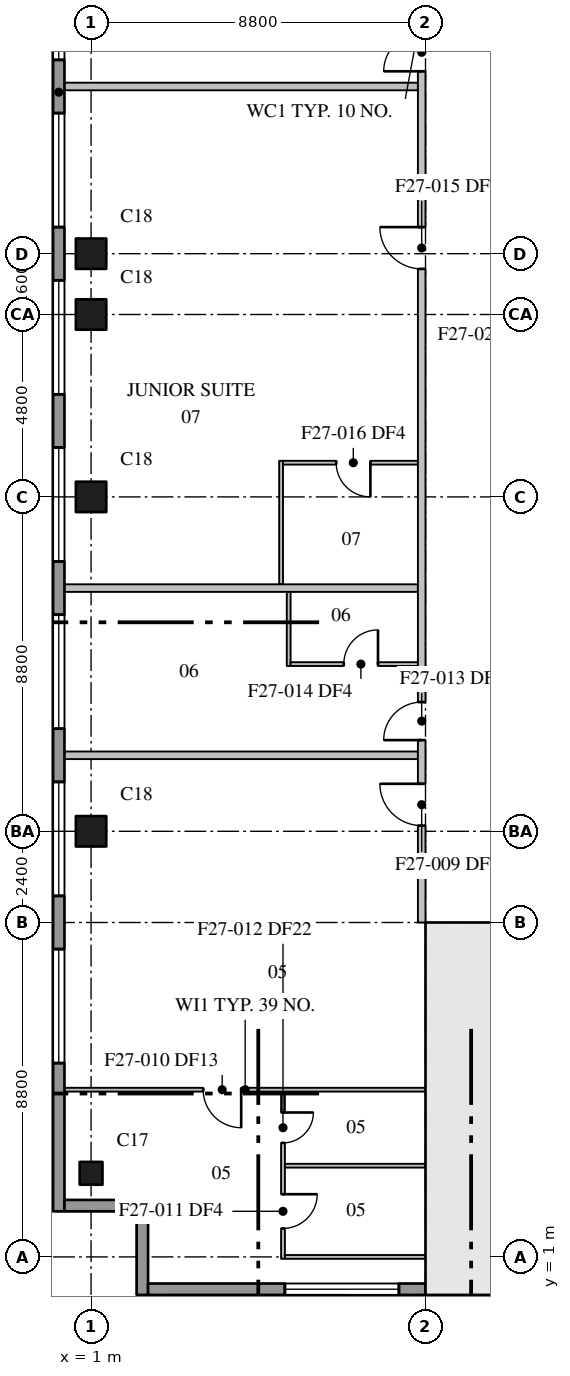
"""IFC4 building model, lengths in metres.
Left out: names, types, materials, properties, quantities, classifications, styles, units other than length and angle.
Written with IfcOpenShell. Run it as: python <this file> out.ifc"""

import sys

from ifc_helpers import new_model, si_unit, direction, frame, frame_2d, origin, origin_2d, place, context, subcontext, project, spatial, rectangle, extrude, element, fill, save


model = new_model("IFC4")
c1 = context("Model", 3, precision=1e-05, world=origin(), true_north=direction((0.0, 1.0)))
c2 = subcontext(c1, "Body", "Model", "MODEL_VIEW")
j1 = project(units=[si_unit("LENGTHUNIT", "METRE"), si_unit("PLANEANGLEUNIT", "RADIAN")], contexts=[c1])
p1 = place(None, origin())
s1 = spatial("IfcSite", under=j1, at=p1, CompositionType="ELEMENT")
p2 = place(p1, origin())
s2 = spatial("IfcBuilding", under=s1, at=p2, CompositionType="ELEMENT")
p3 = place(p2, frame((0.0, 0.0, 226.5)))
s3 = spatial("IfcBuildingStorey", under=s2, at=p3, CompositionType="ELEMENT", Elevation=226.5)
p4 = place(p3, frame((1.0, 3.2, 0.0), z_axis=(0.0, 0.0, 1.0), x_axis=(1.0, 0.0, 0.0)))
e1 = element("IfcColumn", 1, at=p4, inside=s3, PredefinedType="COLUMN", context=c2, shape_type="SweptSolid", body=[
    extrude(rectangle(XDim=0.6, YDim=0.6, at=origin_2d()), origin(), (0.0, 0.0, 1.0), 3.7),
])
for number, where, z_axis, x_axis in (
    (2, (1.0, 12.2, 0.0), (0.0, 0.0, 1.0), (1.0, 0.0, 0.0)),
    (3, (1.0, 21.0, 0.0), (0.0, 0.0, 1.0), (1.0, 0.0, 0.0)),
    (4, (1.0, 25.8, 0.0), (0.0, 0.0, 1.0), (1.0, 0.0, 0.0)),
    (5, (1.0, 27.4, 0.0), (0.0, 0.0, 1.0), (1.0, 0.0, 0.0)),
):
    element("IfcColumn", number, at=place(p3, frame(where, z_axis=z_axis, x_axis=x_axis)), inside=s3, PredefinedType="COLUMN", context=c2, shape_type="SweptSolid", body=[
        extrude(rectangle(XDim=0.8, YDim=0.8, at=origin_2d()), origin(), (0.0, 0.0, 1.0), 3.7),
    ])
p5 = place(p3, frame((9.8, 0.95, 0.0), z_axis=(0.0, 0.0, 1.0), x_axis=(1.0, 0.0, 0.0)))
e6 = element("IfcWall", 6, at=p5, inside=s3, PredefinedType="SHEAR", context=c2, shape_type="SweptSolid", body=[
    extrude(rectangle(XDim=35.2, YDim=0.5, at=frame_2d((17.6, 0.0))), origin(), (0.0, 0.0, 1.0), 3.7),
])
p6 = place(p3, frame((10.75, 1.2, 0.0), z_axis=(0.0, 0.0, 1.0), x_axis=(0.0, 1.0, 0.0)))
e7 = element("IfcWall", 7, at=p6, inside=s3, PredefinedType="SHEAR", context=c2, shape_type="SweptSolid", body=[
    extrude(rectangle(XDim=8.6, YDim=0.5, at=frame_2d((4.3, 0.0))), origin(), (0.0, 0.0, 1.0), 3.7),
])
p7 = place(p3, frame((9.8, 9.6, 0.0), z_axis=(0.0, 0.0, 1.0), x_axis=(1.0, 0.0, 0.0)))
e8 = element("IfcWall", 8, at=p7, inside=s3, PredefinedType="SHEAR", context=c2, shape_type="SweptSolid", body=[
    extrude(rectangle(XDim=4.3, YDim=0.4, at=frame_2d((2.15, 0.0))), origin(), (0.0, 0.0, 1.0), 3.7),
])
p8 = place(p7, frame((2.05, 0.0, 0.0)))
e9 = element("IfcOpeningElement", 9, at=p8, cuts=e8, PredefinedType="OPENING", context=c2, shape_type="SweptSolid", body=[
    extrude(rectangle(XDim=1.2, YDim=2.1, at=frame_2d((0.6, 1.05))), frame((0.0, 0.21, 0.0), z_axis=(0.0, -1.0, 0.0), x_axis=(1.0, 0.0, 0.0)), (0.0, 0.0, 1.0), 0.42),
])
p9 = place(p3, frame((0.15, 61.1, 0.0), z_axis=(0.0, 0.0, 1.0), x_axis=(0.0, -1.0, 0.0)))
e10 = element("IfcWall", 10, at=p9, inside=s3, PredefinedType="STANDARD", context=c2, shape_type="SweptSolid", body=[
    extrude(rectangle(XDim=58.9, YDim=0.3, at=frame_2d((29.45, 0.0))), origin(), (0.0, 0.0, 1.0), 3.4),
])
p10 = place(p9, frame((3.6, 0.0, 0.75)))
e11 = element("IfcOpeningElement", 11, at=p10, cuts=e10, PredefinedType="OPENING", context=c2, shape_type="SweptSolid", body=[
    extrude(rectangle(XDim=3.0, YDim=2.3, at=frame_2d((1.5, 1.15))), frame((0.0, 0.16, 0.0), z_axis=(0.0, -1.0, 0.0), x_axis=(1.0, 0.0, 0.0)), (0.0, 0.0, 1.0), 0.32),
])
p11 = place(p9, frame((8.0, 0.0, 0.75)))
e12 = element("IfcOpeningElement", 12, at=p11, cuts=e10, PredefinedType="OPENING", context=c2, shape_type="SweptSolid", body=[
    extrude(rectangle(XDim=3.0, YDim=2.3, at=frame_2d((1.5, 1.15))), frame((0.0, 0.16, 0.0), z_axis=(0.0, -1.0, 0.0), x_axis=(1.0, 0.0, 0.0)), (0.0, 0.0, 1.0), 0.32),
])
p12 = place(p9, frame((12.4, 0.0, 0.75)))
e13 = element("IfcOpeningElement", 13, at=p12, cuts=e10, PredefinedType="OPENING", context=c2, shape_type="SweptSolid", body=[
    extrude(rectangle(XDim=3.0, YDim=2.3, at=frame_2d((1.5, 1.15))), frame((0.0, 0.16, 0.0), z_axis=(0.0, -1.0, 0.0), x_axis=(1.0, 0.0, 0.0)), (0.0, 0.0, 1.0), 0.32),
])
p13 = place(p9, frame((16.8, 0.0, 0.75)))
e14 = element("IfcOpeningElement", 14, at=p13, cuts=e10, PredefinedType="OPENING", context=c2, shape_type="SweptSolid", body=[
    extrude(rectangle(XDim=3.0, YDim=2.3, at=frame_2d((1.5, 1.15))), frame((0.0, 0.16, 0.0), z_axis=(0.0, -1.0, 0.0), x_axis=(1.0, 0.0, 0.0)), (0.0, 0.0, 1.0), 0.32),
])
p14 = place(p9, frame((21.2, 0.0, 0.75)))
e15 = element("IfcOpeningElement", 15, at=p14, cuts=e10, PredefinedType="OPENING", context=c2, shape_type="SweptSolid", body=[
    extrude(rectangle(XDim=3.0, YDim=2.3, at=frame_2d((1.5, 1.15))), frame((0.0, 0.16, 0.0), z_axis=(0.0, -1.0, 0.0), x_axis=(1.0, 0.0, 0.0)), (0.0, 0.0, 1.0), 0.32),
])
p15 = place(p9, frame((25.6, 0.0, 0.75)))
e16 = element("IfcOpeningElement", 16, at=p15, cuts=e10, PredefinedType="OPENING", context=c2, shape_type="SweptSolid", body=[
    extrude(rectangle(XDim=3.0, YDim=2.3, at=frame_2d((1.5, 1.15))), frame((0.0, 0.16, 0.0), z_axis=(0.0, -1.0, 0.0), x_axis=(1.0, 0.0, 0.0)), (0.0, 0.0, 1.0), 0.32),
])
p16 = place(p9, frame((30.0, 0.0, 0.75)))
e17 = element("IfcOpeningElement", 17, at=p16, cuts=e10, PredefinedType="OPENING", context=c2, shape_type="SweptSolid", body=[
    extrude(rectangle(XDim=3.0, YDim=2.3, at=frame_2d((1.5, 1.15))), frame((0.0, 0.16, 0.0), z_axis=(0.0, -1.0, 0.0), x_axis=(1.0, 0.0, 0.0)), (0.0, 0.0, 1.0), 0.32),
])
p17 = place(p9, frame((34.4, 0.0, 0.75)))
e18 = element("IfcOpeningElement", 18, at=p17, cuts=e10, PredefinedType="OPENING", context=c2, shape_type="SweptSolid", body=[
    extrude(rectangle(XDim=3.0, YDim=2.3, at=frame_2d((1.5, 1.15))), frame((0.0, 0.16, 0.0), z_axis=(0.0, -1.0, 0.0), x_axis=(1.0, 0.0, 0.0)), (0.0, 0.0, 1.0), 0.32),
])
p18 = place(p9, frame((38.8, 0.0, 0.75)))
e19 = element("IfcOpeningElement", 19, at=p18, cuts=e10, PredefinedType="OPENING", context=c2, shape_type="SweptSolid", body=[
    extrude(rectangle(XDim=3.0, YDim=2.3, at=frame_2d((1.5, 1.15))), frame((0.0, 0.16, 0.0), z_axis=(0.0, -1.0, 0.0), x_axis=(1.0, 0.0, 0.0)), (0.0, 0.0, 1.0), 0.32),
])
p19 = place(p9, frame((43.2, 0.0, 0.75)))
e20 = element("IfcOpeningElement", 20, at=p19, cuts=e10, PredefinedType="OPENING", context=c2, shape_type="SweptSolid", body=[
    extrude(rectangle(XDim=3.0, YDim=2.3, at=frame_2d((1.5, 1.15))), frame((0.0, 0.16, 0.0), z_axis=(0.0, -1.0, 0.0), x_axis=(1.0, 0.0, 0.0)), (0.0, 0.0, 1.0), 0.32),
])
p20 = place(p9, frame((47.6, 0.0, 0.75)))
e21 = element("IfcOpeningElement", 21, at=p20, cuts=e10, PredefinedType="OPENING", context=c2, shape_type="SweptSolid", body=[
    extrude(rectangle(XDim=3.0, YDim=2.3, at=frame_2d((1.5, 1.15))), frame((0.0, 0.16, 0.0), z_axis=(0.0, -1.0, 0.0), x_axis=(1.0, 0.0, 0.0)), (0.0, 0.0, 1.0), 0.32),
])
p21 = place(p9, frame((52.0, 0.0, 0.75)))
e22 = element("IfcOpeningElement", 22, at=p21, cuts=e10, PredefinedType="OPENING", context=c2, shape_type="SweptSolid", body=[
    extrude(rectangle(XDim=3.0, YDim=2.3, at=frame_2d((1.5, 1.15))), frame((0.0, 0.16, 0.0), z_axis=(0.0, -1.0, 0.0), x_axis=(1.0, 0.0, 0.0)), (0.0, 0.0, 1.0), 0.32),
])
for number, where, z_axis, x_axis in (
    (23, (0.3, 2.35, 0.0), (0.0, 0.0, 1.0), (1.0, 0.0, 0.0)),
    (24, (2.35, 2.2, 0.0), (0.0, 0.0, 1.0), (0.0, -1.0, 0.0)),
):
    element("IfcWall", number, at=place(p3, frame(where, z_axis=z_axis, x_axis=x_axis)), inside=s3, PredefinedType="STANDARD", context=c2, shape_type="SweptSolid", body=[
        extrude(rectangle(XDim=2.2, YDim=0.3, at=frame_2d((1.1, 0.0))), origin(), (0.0, 0.0, 1.0), 3.4),
    ])
p22 = place(p3, frame((2.5, 0.15, 0.0), z_axis=(0.0, 0.0, 1.0), x_axis=(1.0, 0.0, 0.0)))
e25 = element("IfcWall", 25, at=p22, inside=s3, PredefinedType="STANDARD", context=c2, shape_type="SweptSolid", body=[
    extrude(rectangle(XDim=7.3, YDim=0.3, at=frame_2d((3.65, 0.0))), origin(), (0.0, 0.0, 1.0), 3.4),
])
p23 = place(p22, frame((3.6, 0.0, 0.75)))
e26 = element("IfcOpeningElement", 26, at=p23, cuts=e25, PredefinedType="OPENING", context=c2, shape_type="SweptSolid", body=[
    extrude(rectangle(XDim=3.0, YDim=2.3, at=frame_2d((1.5, 1.15))), frame((0.0, 0.16, 0.0), z_axis=(0.0, -1.0, 0.0), x_axis=(1.0, 0.0, 0.0)), (0.0, 0.0, 1.0), 0.32),
])
p24 = place(p3, frame((9.7, 9.8, 0.0), z_axis=(0.0, 0.0, 1.0), x_axis=(0.0, 1.0, 0.0)))
e27 = element("IfcWall", 27, at=p24, inside=s3, PredefinedType="PARTITIONING", context=c2, shape_type="SweptSolid", body=[
    extrude(rectangle(XDim=48.0, YDim=0.2, at=frame_2d((24.0, 0.0))), origin(), (0.0, 0.0, 1.0), 3.4),
])
p25 = place(p24, frame((2.55, 0.0, 0.0)))
e28 = element("IfcOpeningElement", 28, at=p25, cuts=e27, PredefinedType="OPENING", context=c2, shape_type="SweptSolid", body=[
    extrude(rectangle(XDim=1.1, YDim=2.1, at=frame_2d((0.55, 1.05))), frame((0.0, 0.11, 0.0), z_axis=(0.0, -1.0, 0.0), x_axis=(1.0, 0.0, 0.0)), (0.0, 0.0, 1.0), 0.22),
])
p26 = place(p24, frame((4.8, 0.0, 0.0)))
e29 = element("IfcOpeningElement", 29, at=p26, cuts=e27, PredefinedType="OPENING", context=c2, shape_type="SweptSolid", body=[
    extrude(rectangle(XDim=1.0, YDim=2.1, at=frame_2d((0.5, 1.05))), frame((0.0, 0.11, 0.0), z_axis=(0.0, -1.0, 0.0), x_axis=(1.0, 0.0, 0.0)), (0.0, 0.0, 1.0), 0.22),
])
p27 = place(p24, frame((17.2, 0.0, 0.0)))
e30 = element("IfcOpeningElement", 30, at=p27, cuts=e27, PredefinedType="OPENING", context=c2, shape_type="SweptSolid", body=[
    extrude(rectangle(XDim=1.1, YDim=2.1, at=frame_2d((0.55, 1.05))), frame((0.0, 0.11, 0.0), z_axis=(0.0, -1.0, 0.0), x_axis=(1.0, 0.0, 0.0)), (0.0, 0.0, 1.0), 0.22),
])
p28 = place(p24, frame((22.4, 0.0, 0.0)))
e31 = element("IfcOpeningElement", 31, at=p28, cuts=e27, PredefinedType="OPENING", context=c2, shape_type="SweptSolid", body=[
    extrude(rectangle(XDim=1.0, YDim=2.1, at=frame_2d((0.5, 1.05))), frame((0.0, 0.11, 0.0), z_axis=(0.0, -1.0, 0.0), x_axis=(1.0, 0.0, 0.0)), (0.0, 0.0, 1.0), 0.22),
])
p29 = place(p24, frame((32.6, 0.0, 0.0)))
e32 = element("IfcOpeningElement", 32, at=p29, cuts=e27, PredefinedType="OPENING", context=c2, shape_type="SweptSolid", body=[
    extrude(rectangle(XDim=1.1, YDim=2.1, at=frame_2d((0.55, 1.05))), frame((0.0, 0.11, 0.0), z_axis=(0.0, -1.0, 0.0), x_axis=(1.0, 0.0, 0.0)), (0.0, 0.0, 1.0), 0.22),
])
p30 = place(p24, frame((35.6, 0.0, 0.0)))
e33 = element("IfcOpeningElement", 33, at=p30, cuts=e27, PredefinedType="OPENING", context=c2, shape_type="SweptSolid", body=[
    extrude(rectangle(XDim=1.0, YDim=2.1, at=frame_2d((0.5, 1.05))), frame((0.0, 0.11, 0.0), z_axis=(0.0, -1.0, 0.0), x_axis=(1.0, 0.0, 0.0)), (0.0, 0.0, 1.0), 0.22),
])
p31 = place(p24, frame((45.6, 0.0, 0.0)))
e34 = element("IfcOpeningElement", 34, at=p31, cuts=e27, PredefinedType="OPENING", context=c2, shape_type="SweptSolid", body=[
    extrude(rectangle(XDim=1.1, YDim=2.1, at=frame_2d((0.55, 1.05))), frame((0.0, 0.11, 0.0), z_axis=(0.0, -1.0, 0.0), x_axis=(1.0, 0.0, 0.0)), (0.0, 0.0, 1.0), 0.22),
])
for number, where, z_axis, x_axis in (
    (35, (0.31, 14.2, 0.0), (0.0, 0.0, 1.0), (1.0, 0.0, 0.0)),
    (36, (0.31, 18.6, 0.0), (0.0, 0.0, 1.0), (1.0, 0.0, 0.0)),
    (37, (0.31, 31.8, 0.0), (0.0, 0.0, 1.0), (1.0, 0.0, 0.0)),
):
    element("IfcWall", number, at=place(p3, frame(where, z_axis=z_axis, x_axis=x_axis)), inside=s3, PredefinedType="PARTITIONING", context=c2, shape_type="SweptSolid", body=[
        extrude(rectangle(XDim=9.29, YDim=0.2, at=frame_2d((4.645, 0.0))), origin(), (0.0, 0.0, 1.0), 3.4),
    ])
p32 = place(p3, frame((6.05, 5.35, 0.0), z_axis=(0.0, 0.0, 1.0), x_axis=(0.0, -1.0, 0.0)))
e38 = element("IfcWall", 38, at=p32, inside=s3, PredefinedType="PARTITIONING", context=c2, shape_type="SweptSolid", body=[
    extrude(rectangle(XDim=4.4, YDim=0.1, at=frame_2d((2.2, 0.0))), origin(), (0.0, 0.0, 1.0), 3.4),
])
p33 = place(p32, frame((2.7, 0.0, 0.0)))
e39 = element("IfcOpeningElement", 39, at=p33, cuts=e38, PredefinedType="OPENING", context=c2, shape_type="SweptSolid", body=[
    extrude(rectangle(XDim=0.9, YDim=2.1, at=frame_2d((0.45, 1.05))), frame((0.0, 0.06, 0.0), z_axis=(0.0, -1.0, 0.0), x_axis=(1.0, 0.0, 0.0)), (0.0, 0.0, 1.0), 0.12),
])
p34 = place(p32, frame((0.55, 0.0, 0.0)))
e40 = element("IfcOpeningElement", 40, at=p34, cuts=e38, PredefinedType="OPENING", context=c2, shape_type="SweptSolid", body=[
    extrude(rectangle(XDim=0.8, YDim=2.1, at=frame_2d((0.4, 1.05))), frame((0.0, 0.06, 0.0), z_axis=(0.0, -1.0, 0.0), x_axis=(1.0, 0.0, 0.0)), (0.0, 0.0, 1.0), 0.12),
])
p35 = place(p3, frame((9.8, 5.4, 0.0), z_axis=(0.0, 0.0, 1.0), x_axis=(-1.0, 0.0, 0.0)))
e41 = element("IfcWall", 41, at=p35, inside=s3, PredefinedType="PARTITIONING", context=c2, shape_type="SweptSolid", body=[
    extrude(rectangle(XDim=9.49, YDim=0.1, at=frame_2d((4.745, 0.0))), origin(), (0.0, 0.0, 1.0), 3.4),
])
p36 = place(p35, frame((4.85, 0.0, 0.0)))
e42 = element("IfcOpeningElement", 42, at=p36, cuts=e41, PredefinedType="OPENING", context=c2, shape_type="SweptSolid", body=[
    extrude(rectangle(XDim=1.0, YDim=2.1, at=frame_2d((0.5, 1.05))), frame((0.0, 0.06, 0.0), z_axis=(0.0, -1.0, 0.0), x_axis=(1.0, 0.0, 0.0)), (0.0, 0.0, 1.0), 0.12),
])
for number, where, z_axis, x_axis in (
    (43, (6.1, 1.0, 0.0), (0.0, 0.0, 1.0), (1.0, 0.0, 0.0)),
    (44, (6.1, 3.4, 0.0), (0.0, 0.0, 1.0), (1.0, 0.0, 0.0)),
):
    element("IfcWall", number, at=place(p3, frame(where, z_axis=z_axis, x_axis=x_axis)), inside=s3, PredefinedType="PARTITIONING", context=c2, shape_type="SweptSolid", body=[
        extrude(rectangle(XDim=3.7, YDim=0.1, at=frame_2d((1.85, 0.0))), origin(), (0.0, 0.0, 1.0), 3.4),
    ])
p37 = place(p3, frame((6.2, 16.55, 0.0), z_axis=(0.0, 0.0, 1.0), x_axis=(0.0, 1.0, 0.0)))
e45 = element("IfcWall", 45, at=p37, inside=s3, PredefinedType="PARTITIONING", context=c2, shape_type="SweptSolid", body=[
    extrude(rectangle(XDim=1.95, YDim=0.1, at=frame_2d((0.975, 0.0))), origin(), (0.0, 0.0, 1.0), 3.4),
])
p38 = place(p3, frame((6.25, 16.6, 0.0), z_axis=(0.0, 0.0, 1.0), x_axis=(1.0, 0.0, 0.0)))
e46 = element("IfcWall", 46, at=p38, inside=s3, PredefinedType="PARTITIONING", context=c2, shape_type="SweptSolid", body=[
    extrude(rectangle(XDim=3.35, YDim=0.1, at=frame_2d((1.675, 0.0))), origin(), (0.0, 0.0, 1.0), 3.4),
])
p39 = place(p38, frame((1.4, 0.0, 0.0)))
e47 = element("IfcOpeningElement", 47, at=p39, cuts=e46, PredefinedType="OPENING", context=c2, shape_type="SweptSolid", body=[
    extrude(rectangle(XDim=0.9, YDim=2.1, at=frame_2d((0.45, 1.05))), frame((0.0, 0.06, 0.0), z_axis=(0.0, -1.0, 0.0), x_axis=(1.0, 0.0, 0.0)), (0.0, 0.0, 1.0), 0.12),
])
p40 = place(p3, frame((6.0, 18.7, 0.0), z_axis=(0.0, 0.0, 1.0), x_axis=(0.0, 1.0, 0.0)))
e48 = element("IfcWall", 48, at=p40, inside=s3, PredefinedType="PARTITIONING", context=c2, shape_type="SweptSolid", body=[
    extrude(rectangle(XDim=3.25, YDim=0.1, at=frame_2d((1.625, 0.0))), origin(), (0.0, 0.0, 1.0), 3.4),
])
p41 = place(p3, frame((9.6, 21.9, 0.0), z_axis=(0.0, 0.0, 1.0), x_axis=(-1.0, 0.0, 0.0)))
e49 = element("IfcWall", 49, at=p41, inside=s3, PredefinedType="PARTITIONING", context=c2, shape_type="SweptSolid", body=[
    extrude(rectangle(XDim=3.55, YDim=0.1, at=frame_2d((1.775, 0.0))), origin(), (0.0, 0.0, 1.0), 3.4),
])
p42 = place(p41, frame((1.25, 0.0, 0.0)))
e50 = element("IfcOpeningElement", 50, at=p42, cuts=e49, PredefinedType="OPENING", context=c2, shape_type="SweptSolid", body=[
    extrude(rectangle(XDim=0.9, YDim=2.1, at=frame_2d((0.45, 1.05))), frame((0.0, 0.06, 0.0), z_axis=(0.0, -1.0, 0.0), x_axis=(1.0, 0.0, 0.0)), (0.0, 0.0, 1.0), 0.12),
])
p43 = place(p15, origin())
e51 = element("IfcWindow", 51, at=p43, inside=s3, PartitioningType="SINGLE_PANEL", PredefinedType="WINDOW", context=c2, shape_type="SweptSolid", body=[
    extrude(rectangle(XDim=3.0, YDim=2.3, at=frame_2d((1.5, 1.15))), frame((0.0, 0.03, 0.0), z_axis=(0.0, -1.0, 0.0), x_axis=(1.0, 0.0, 0.0)), (0.0, 0.0, 1.0), 0.06),
])
fill(e16, e51)
p44 = place(p16, origin())
e52 = element("IfcWindow", 52, at=p44, inside=s3, PartitioningType="SINGLE_PANEL", PredefinedType="WINDOW", context=c2, shape_type="SweptSolid", body=[
    extrude(rectangle(XDim=3.0, YDim=2.3, at=frame_2d((1.5, 1.15))), frame((0.0, 0.03, 0.0), z_axis=(0.0, -1.0, 0.0), x_axis=(1.0, 0.0, 0.0)), (0.0, 0.0, 1.0), 0.06),
])
fill(e17, e52)
p45 = place(p17, origin())
e53 = element("IfcWindow", 53, at=p45, inside=s3, PartitioningType="SINGLE_PANEL", PredefinedType="WINDOW", context=c2, shape_type="SweptSolid", body=[
    extrude(rectangle(XDim=3.0, YDim=2.3, at=frame_2d((1.5, 1.15))), frame((0.0, 0.03, 0.0), z_axis=(0.0, -1.0, 0.0), x_axis=(1.0, 0.0, 0.0)), (0.0, 0.0, 1.0), 0.06),
])
fill(e18, e53)
p46 = place(p18, origin())
e54 = element("IfcWindow", 54, at=p46, inside=s3, PartitioningType="SINGLE_PANEL", PredefinedType="WINDOW", context=c2, shape_type="SweptSolid", body=[
    extrude(rectangle(XDim=3.0, YDim=2.3, at=frame_2d((1.5, 1.15))), frame((0.0, 0.03, 0.0), z_axis=(0.0, -1.0, 0.0), x_axis=(1.0, 0.0, 0.0)), (0.0, 0.0, 1.0), 0.06),
])
fill(e19, e54)
p47 = place(p19, origin())
e55 = element("IfcWindow", 55, at=p47, inside=s3, PartitioningType="SINGLE_PANEL", PredefinedType="WINDOW", context=c2, shape_type="SweptSolid", body=[
    extrude(rectangle(XDim=3.0, YDim=2.3, at=frame_2d((1.5, 1.15))), frame((0.0, 0.03, 0.0), z_axis=(0.0, -1.0, 0.0), x_axis=(1.0, 0.0, 0.0)), (0.0, 0.0, 1.0), 0.06),
])
fill(e20, e55)
p48 = place(p20, origin())
e56 = element("IfcWindow", 56, at=p48, inside=s3, PartitioningType="SINGLE_PANEL", PredefinedType="WINDOW", context=c2, shape_type="SweptSolid", body=[
    extrude(rectangle(XDim=3.0, YDim=2.3, at=frame_2d((1.5, 1.15))), frame((0.0, 0.03, 0.0), z_axis=(0.0, -1.0, 0.0), x_axis=(1.0, 0.0, 0.0)), (0.0, 0.0, 1.0), 0.06),
])
fill(e21, e56)
p49 = place(p21, origin())
e57 = element("IfcWindow", 57, at=p49, inside=s3, PartitioningType="SINGLE_PANEL", PredefinedType="WINDOW", context=c2, shape_type="SweptSolid", body=[
    extrude(rectangle(XDim=3.0, YDim=2.3, at=frame_2d((1.5, 1.15))), frame((0.0, 0.03, 0.0), z_axis=(0.0, -1.0, 0.0), x_axis=(1.0, 0.0, 0.0)), (0.0, 0.0, 1.0), 0.06),
])
fill(e22, e57)
p50 = place(p23, origin())
e58 = element("IfcWindow", 58, at=p50, inside=s3, PartitioningType="SINGLE_PANEL", PredefinedType="WINDOW", context=c2, shape_type="SweptSolid", body=[
    extrude(rectangle(XDim=3.0, YDim=2.3, at=frame_2d((1.5, 1.15))), frame((0.0, 0.03, 0.0), z_axis=(0.0, -1.0, 0.0), x_axis=(1.0, 0.0, 0.0)), (0.0, 0.0, 1.0), 0.06),
])
fill(e26, e58)
p51 = place(p25, origin())
e59 = element("IfcDoor", 59, at=p51, inside=s3, OperationType="SINGLE_SWING_RIGHT", PredefinedType="DOOR", context=c2, shape_type="SweptSolid", body=[
    extrude(rectangle(XDim=1.1, YDim=2.1, at=frame_2d((0.55, 1.05))), frame((0.0, 0.025, 0.0), z_axis=(0.0, -1.0, 0.0), x_axis=(1.0, 0.0, 0.0)), (0.0, 0.0, 1.0), 0.05),
])
fill(e28, e59)
p52 = place(p36, origin())
e60 = element("IfcDoor", 60, at=p52, inside=s3, OperationType="SINGLE_SWING_LEFT", PredefinedType="DOOR", context=c2, shape_type="SweptSolid", body=[
    extrude(rectangle(XDim=1.0, YDim=2.1, at=frame_2d((0.5, 1.05))), frame((0.0, 0.025, 0.0), z_axis=(0.0, -1.0, 0.0), x_axis=(1.0, 0.0, 0.0)), (0.0, 0.0, 1.0), 0.05),
])
fill(e42, e60)
p53 = place(p33, origin())
e61 = element("IfcDoor", 61, at=p53, inside=s3, OperationType="SINGLE_SWING_LEFT", PredefinedType="DOOR", context=c2, shape_type="SweptSolid", body=[
    extrude(rectangle(XDim=0.9, YDim=2.1, at=frame_2d((0.45, 1.05))), frame((0.0, 0.025, 0.0), z_axis=(0.0, -1.0, 0.0), x_axis=(1.0, 0.0, 0.0)), (0.0, 0.0, 1.0), 0.05),
])
fill(e39, e61)
p54 = place(p34, origin())
e62 = element("IfcDoor", 62, at=p54, inside=s3, OperationType="SINGLE_SWING_LEFT", PredefinedType="DOOR", context=c2, shape_type="SweptSolid", body=[
    extrude(rectangle(XDim=0.8, YDim=2.1, at=frame_2d((0.4, 1.05))), frame((0.0, 0.025, 0.0), z_axis=(0.0, -1.0, 0.0), x_axis=(1.0, 0.0, 0.0)), (0.0, 0.0, 1.0), 0.05),
])
fill(e40, e62)
p55 = place(p26, origin())
e63 = element("IfcDoor", 63, at=p55, inside=s3, OperationType="SINGLE_SWING_LEFT", PredefinedType="DOOR", context=c2, shape_type="SweptSolid", body=[
    extrude(rectangle(XDim=1.0, YDim=2.1, at=frame_2d((0.5, 1.05))), frame((0.0, 0.025, 0.0), z_axis=(0.0, -1.0, 0.0), x_axis=(1.0, 0.0, 0.0)), (0.0, 0.0, 1.0), 0.05),
])
fill(e29, e63)
p56 = place(p39, origin())
e64 = element("IfcDoor", 64, at=p56, inside=s3, OperationType="SINGLE_SWING_RIGHT", PredefinedType="DOOR", context=c2, shape_type="SweptSolid", body=[
    extrude(rectangle(XDim=0.9, YDim=2.1, at=frame_2d((0.45, 1.05))), frame((0.0, 0.025, 0.0), z_axis=(0.0, -1.0, 0.0), x_axis=(1.0, 0.0, 0.0)), (0.0, 0.0, 1.0), 0.05),
])
fill(e47, e64)
p57 = place(p27, origin())
e65 = element("IfcDoor", 65, at=p57, inside=s3, OperationType="SINGLE_SWING_RIGHT", PredefinedType="DOOR", context=c2, shape_type="SweptSolid", body=[
    extrude(rectangle(XDim=1.1, YDim=2.1, at=frame_2d((0.55, 1.05))), frame((0.0, 0.025, 0.0), z_axis=(0.0, -1.0, 0.0), x_axis=(1.0, 0.0, 0.0)), (0.0, 0.0, 1.0), 0.05),
])
fill(e30, e65)
p58 = place(p42, origin())
e66 = element("IfcDoor", 66, at=p58, inside=s3, OperationType="SINGLE_SWING_LEFT", PredefinedType="DOOR", context=c2, shape_type="SweptSolid", body=[
    extrude(rectangle(XDim=0.9, YDim=2.1, at=frame_2d((0.45, 1.05))), frame((0.0, 0.025, 0.0), z_axis=(0.0, -1.0, 0.0), x_axis=(1.0, 0.0, 0.0)), (0.0, 0.0, 1.0), 0.05),
])
fill(e50, e66)
p59 = place(p28, origin())
e67 = element("IfcDoor", 67, at=p59, inside=s3, OperationType="SINGLE_SWING_LEFT", PredefinedType="DOOR", context=c2, shape_type="SweptSolid", body=[
    extrude(rectangle(XDim=1.0, YDim=2.1, at=frame_2d((0.5, 1.05))), frame((0.0, 0.025, 0.0), z_axis=(0.0, -1.0, 0.0), x_axis=(1.0, 0.0, 0.0)), (0.0, 0.0, 1.0), 0.05),
])
fill(e31, e67)
save(model, sys.argv[1])
